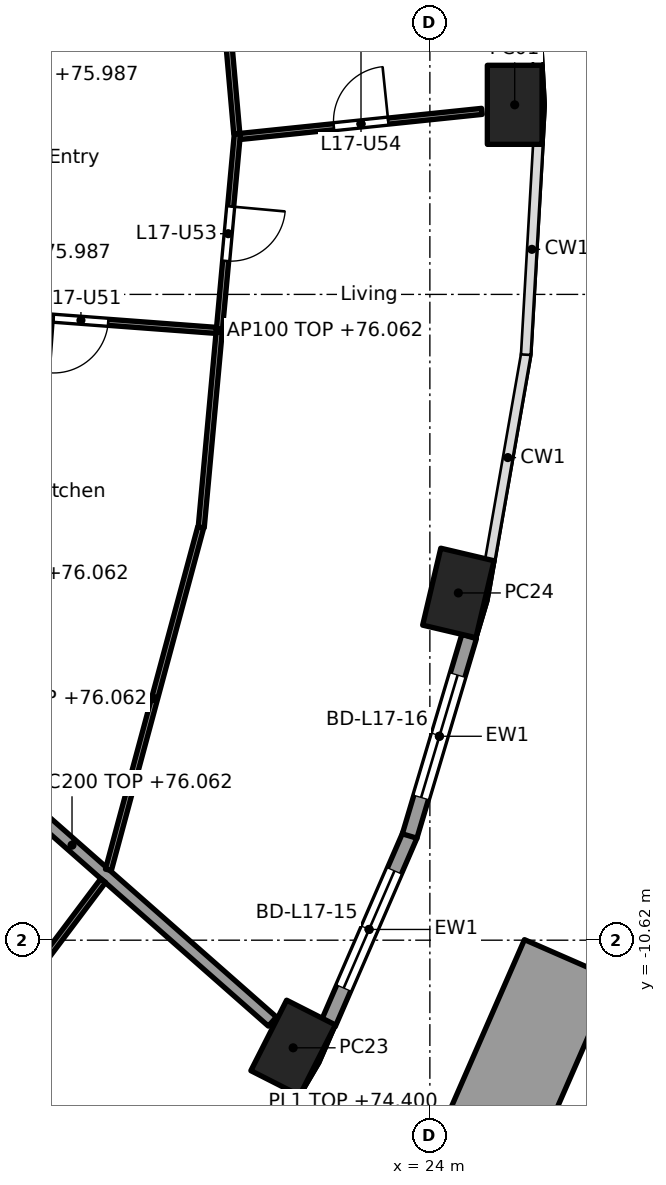
"""IFC4 building model, lengths in metres.
Left out: names, types, materials, properties, quantities, classifications, styles, units other than length and angle.
Written with IfcOpenShell. Run it as: python <this file> out.ifc"""

import sys

from ifc_helpers import new_model, si_unit, direction, frame, frame_2d, origin, origin_2d, place, context, subcontext, project, spatial, rectangle, hollow_rectangle, extrude, element, fill, save


model = new_model("IFC4")
c1 = context("Model", 3, precision=1e-05, world=origin(), true_north=direction((0.0, 1.0)))
c2 = subcontext(c1, "Body", "Model", "MODEL_VIEW")
j1 = project(units=[si_unit("LENGTHUNIT", "METRE"), si_unit("PLANEANGLEUNIT", "RADIAN")], contexts=[c1])
p1 = place(None, origin())
s1 = spatial("IfcSite", under=j1, at=p1, CompositionType="ELEMENT")
p2 = place(p1, origin())
s2 = spatial("IfcBuilding", under=s1, at=p2, CompositionType="ELEMENT")
p3 = place(p2, frame((0.0, 0.0, 73.3)))
s3 = spatial("IfcBuildingStorey", under=s2, at=p3, CompositionType="ELEMENT", Elevation=73.3)
for number, where, z_axis, x_axis in (
    (1, (25.395, 3.118, -0.26), (0.0, 0.0, 1.0), (0.0, 1.0, 0.0)),
    (2, (21.751, -12.39, -0.26), (0.0, 0.0, 1.0), (0.452, 0.892, 0.0)),
    (3, (24.468, -4.91, -0.26), (0.0, 0.0, 1.0), (0.229, 0.973, 0.0)),
):
    element("IfcColumn", number, at=place(p3, frame(where, z_axis=z_axis, x_axis=x_axis)), inside=s3, PredefinedType="COLUMN", context=c2, shape_type="SweptSolid", body=[
        extrude(hollow_rectangle(XDim=1.3, YDim=0.9, WallThickness=0.045, at=origin_2d()), origin(), (0.0, 0.0, 1.0), 3.96),
    ])
p4 = place(p3, frame((23.672, -8.893, 0.0), z_axis=(0.0, 0.0, 1.0), x_axis=(-0.397621629246, -0.917549475481, 0.0)))
e4 = element("IfcWall", 4, at=p4, inside=s3, PredefinedType="SOLIDWALL", context=c2, shape_type="SweptSolid", body=[
    extrude(rectangle(XDim=3.379, YDim=0.25, at=frame_2d((1.69, 0.0))), origin(), (0.0, 0.0, 1.0), 3.44),
])
p5 = place(p4, frame((0.64, 0.0, 0.0)))
e5 = element("IfcOpeningElement", 5, at=p5, cuts=e4, PredefinedType="OPENING", context=c2, shape_type="SweptSolid", body=[
    extrude(rectangle(XDim=2.1, YDim=2.4, at=frame_2d((1.05, 1.2))), frame((0.0, 0.135, 0.0), z_axis=(0.0, -1.0, 0.0), x_axis=(1.0, 0.0, 0.0)), (0.0, 0.0, 1.0), 0.27),
])
p6 = place(p3, frame((24.646, -5.626, 0.0), z_axis=(0.0, 0.0, 1.0), x_axis=(-0.285901631201, -0.958258971926, 0.0)))
e6 = element("IfcWall", 6, at=p6, inside=s3, PredefinedType="SOLIDWALL", context=c2, shape_type="SweptSolid", body=[
    extrude(rectangle(XDim=3.423, YDim=0.25, at=frame_2d((1.712, 0.0))), origin(), (0.0, 0.0, 1.0), 3.44),
])
p7 = place(p6, frame((0.662, 0.0, 0.0)))
e7 = element("IfcOpeningElement", 7, at=p7, cuts=e6, PredefinedType="OPENING", context=c2, shape_type="SweptSolid", body=[
    extrude(rectangle(XDim=2.1, YDim=2.4, at=frame_2d((1.05, 1.2))), frame((0.0, 0.135, 0.0), z_axis=(0.0, -1.0, 0.0), x_axis=(1.0, 0.0, 0.0)), (0.0, 0.0, 1.0), 0.27),
])
p8 = place(p3, frame((29.106, -12.307, 0.0), z_axis=(0.0, 0.0, 1.0), x_axis=(-0.452415298041, -0.891807377239, 0.0)))
e8 = element("IfcWall", 8, at=p8, inside=s3, PredefinedType="SOLIDWALL", context=c2, shape_type="SweptSolid", body=[
    extrude(rectangle(XDim=7.761, YDim=1.6, at=frame_2d((3.88, 0.0))), origin(), (0.0, 0.0, 1.0), 1.1),
])
p9 = place(p3, frame((23.219, -17.954, 0.0), z_axis=(0.0, 0.0, 1.0), x_axis=(0.40049126799, 0.916300575283, 0.0)))
e9 = element("IfcWall", 9, at=p9, inside=s3, PredefinedType="SOLIDWALL", context=c2, shape_type="SweptSolid", body=[
    extrude(rectangle(XDim=7.664, YDim=1.6, at=frame_2d((3.832, 0.0))), origin(), (0.0, 0.0, 1.0), 1.1),
])
p10 = place(p3, frame((14.82, -6.156, 0.0), z_axis=(0.0, 0.0, 1.0), x_axis=(0.750582231659, -0.660777052808, 0.0)))
e10 = element("IfcWall", 10, at=p10, inside=s3, PredefinedType="PARTITIONING", context=c2, shape_type="SweptSolid", body=[
    extrude(rectangle(XDim=8.781, YDim=0.2, at=frame_2d((4.391, 0.0))), origin(), (0.0, 0.0, 1.0), 2.762),
])
p11 = place(p3, frame((20.879, 2.597, 0.0), z_axis=(0.0, 0.0, 1.0), x_axis=(0.994666546694, 0.103142914868, 0.0)))
e11 = element("IfcWall", 11, at=p11, inside=s3, PredefinedType="PARTITIONING", context=c2, shape_type="SweptSolid", body=[
    extrude(rectangle(XDim=3.998, YDim=0.1, at=frame_2d((1.999, 0.0))), origin(), (0.0, 0.0, 1.0), 2.762),
])
p12 = place(p11, frame((1.549, 0.0, 0.0)))
e12 = element("IfcOpeningElement", 12, at=p12, cuts=e11, PredefinedType="OPENING", context=c2, shape_type="SweptSolid", body=[
    extrude(rectangle(XDim=0.9, YDim=2.1, at=frame_2d((0.45, 1.05))), frame((0.0, 0.06, 0.0), z_axis=(0.0, -1.0, 0.0), x_axis=(1.0, 0.0, 0.0)), (0.0, 0.0, 1.0), 0.12),
])
p13 = place(p3, frame((20.825, 2.642, 0.0), z_axis=(0.0, 0.0, 1.0), x_axis=(-0.087760219522, 0.996141628419, 0.0)))
e13 = element("IfcWall", 13, at=p13, inside=s3, PredefinedType="PARTITIONING", context=c2, shape_type="SweptSolid", body=[
    extrude(rectangle(XDim=6.187, YDim=0.1, at=frame_2d((3.094, 0.0))), origin(), (0.0, 0.0, 1.0), 2.762),
])
p14 = place(p3, frame((20.834, 2.642, 0.0), z_axis=(0.0, 0.0, 1.0), x_axis=(-0.091385407685, -0.995815599025, 0.0)))
e14 = element("IfcWall", 14, at=p14, inside=s3, PredefinedType="PARTITIONING", context=c2, shape_type="SweptSolid", body=[
    extrude(rectangle(XDim=6.502, YDim=0.1, at=frame_2d((3.251, 0.0))), origin(), (0.0, 0.0, 1.0), 2.762),
])
p15 = place(p14, frame((1.201, 0.0, 0.0)))
e15 = element("IfcOpeningElement", 15, at=p15, cuts=e14, PredefinedType="OPENING", context=c2, shape_type="SweptSolid", body=[
    extrude(rectangle(XDim=0.9, YDim=2.1, at=frame_2d((0.45, 1.05))), frame((0.0, 0.06, 0.0), z_axis=(0.0, -1.0, 0.0), x_axis=(1.0, 0.0, 0.0)), (0.0, 0.0, 1.0), 0.12),
])
p16 = place(p3, frame((12.661, 3.497, 0.0), z_axis=(0.0, 0.0, 1.0), x_axis=(0.961626678623, 0.274361314621, 0.0)))
e16 = element("IfcWall", 16, at=p16, inside=s3, PredefinedType="PARTITIONING", context=c2, shape_type="SweptSolid", body=[
    extrude(rectangle(XDim=8.156, YDim=0.1, at=frame_2d((4.078, 0.0))), origin(), (0.0, 0.0, 1.0), 2.687),
])
p17 = place(p16, frame((0.446, 0.0, 0.0)))
e17 = element("IfcOpeningElement", 17, at=p17, cuts=e16, PredefinedType="OPENING", context=c2, shape_type="SweptSolid", body=[
    extrude(rectangle(XDim=0.9, YDim=2.1, at=frame_2d((0.45, 1.05))), frame((0.0, 0.06, 0.0), z_axis=(0.0, -1.0, 0.0), x_axis=(1.0, 0.0, 0.0)), (0.0, 0.0, 1.0), 0.12),
])
p18 = place(p16, frame((5.39, 0.0, 0.0)))
e18 = element("IfcOpeningElement", 18, at=p18, cuts=e16, PredefinedType="OPENING", context=c2, shape_type="SweptSolid", body=[
    extrude(rectangle(XDim=0.9, YDim=2.1, at=frame_2d((0.45, 1.05))), frame((0.0, 0.06, 0.0), z_axis=(0.0, -1.0, 0.0), x_axis=(1.0, 0.0, 0.0)), (0.0, 0.0, 1.0), 0.12),
])
p19 = place(p3, frame((14.372, -15.3, 0.0), z_axis=(0.0, 0.0, 1.0), x_axis=(0.600987107857, 0.79925871668, 0.0)))
e19 = element("IfcWall", 19, at=p19, inside=s3, PredefinedType="PARTITIONING", context=c2, shape_type="SweptSolid", body=[
    extrude(rectangle(XDim=7.08, YDim=0.1, at=frame_2d((3.54, 0.0))), origin(), (0.0, 0.0, 1.0), 2.762),
])
p20 = place(p19, frame((3.115, 0.0, 0.0)))
e20 = element("IfcOpeningElement", 20, at=p20, cuts=e19, PredefinedType="OPENING", context=c2, shape_type="SweptSolid", body=[
    extrude(rectangle(XDim=0.9, YDim=2.1, at=frame_2d((0.45, 1.05))), frame((0.0, 0.06, 0.0), z_axis=(0.0, -1.0, 0.0), x_axis=(1.0, 0.0, 0.0)), (0.0, 0.0, 1.0), 0.12),
])
p21 = place(p3, frame((18.713, -9.464, 0.0), z_axis=(0.0, 0.0, 1.0), x_axis=(0.260279646259, 0.965533275316, 0.0)))
e21 = element("IfcWall", 21, at=p21, inside=s3, PredefinedType="PARTITIONING", context=c2, shape_type="SweptSolid", body=[
    extrude(rectangle(XDim=5.833, YDim=0.1, at=frame_2d((2.917, 0.0))), origin(), (0.0, 0.0, 1.0), 2.762),
])
p22 = place(p3, frame((12.665, -0.008, 0.0), z_axis=(0.0, 0.0, 1.0), x_axis=(0.997222647159, -0.074478130978, 0.0)))
e22 = element("IfcWall", 22, at=p22, inside=s3, PredefinedType="PARTITIONING", context=c2, shape_type="SweptSolid", body=[
    extrude(rectangle(XDim=7.844, YDim=0.1, at=frame_2d((3.922, 0.0))), origin(), (0.0, 0.0, 1.0), 2.687),
])
p23 = place(p22, frame((1.241, 0.0, 0.0)))
e23 = element("IfcOpeningElement", 23, at=p23, cuts=e22, PredefinedType="OPENING", context=c2, shape_type="SweptSolid", body=[
    extrude(rectangle(XDim=0.9, YDim=2.1, at=frame_2d((0.45, 1.05))), frame((0.0, 0.06, 0.0), z_axis=(0.0, -1.0, 0.0), x_axis=(1.0, 0.0, 0.0)), (0.0, 0.0, 1.0), 0.12),
])
p24 = place(p22, frame((5.163, 0.0, 0.0)))
e24 = element("IfcOpeningElement", 24, at=p24, cuts=e22, PredefinedType="OPENING", context=c2, shape_type="SweptSolid", body=[
    extrude(rectangle(XDim=0.9, YDim=2.1, at=frame_2d((0.45, 1.05))), frame((0.0, 0.06, 0.0), z_axis=(0.0, -1.0, 0.0), x_axis=(1.0, 0.0, 0.0)), (0.0, 0.0, 1.0), 0.12),
])
p25 = place(p5, origin())
e25 = element("IfcDoor", 25, at=p25, inside=s3, OperationType="SLIDING_TO_LEFT", PredefinedType="DOOR", context=c2, shape_type="SweptSolid", body=[
    extrude(rectangle(XDim=2.1, YDim=2.4, at=frame_2d((1.05, 1.2))), frame((0.0, 0.025, 0.0), z_axis=(0.0, -1.0, 0.0), x_axis=(1.0, 0.0, 0.0)), (0.0, 0.0, 1.0), 0.05),
])
fill(e5, e25)
p26 = place(p7, origin())
e26 = element("IfcDoor", 26, at=p26, inside=s3, OperationType="SLIDING_TO_LEFT", PredefinedType="DOOR", context=c2, shape_type="SweptSolid", body=[
    extrude(rectangle(XDim=2.1, YDim=2.4, at=frame_2d((1.05, 1.2))), frame((0.0, 0.025, 0.0), z_axis=(0.0, -1.0, 0.0), x_axis=(1.0, 0.0, 0.0)), (0.0, 0.0, 1.0), 0.05),
])
fill(e7, e26)
p27 = place(p24, frame((0.9, 0.0, 0.0), x_axis=(-1.0, 0.0, 0.0)))
e27 = element("IfcDoor", 27, at=p27, inside=s3, OperationType="SINGLE_SWING_RIGHT", PredefinedType="DOOR", context=c2, shape_type="SweptSolid", body=[
    extrude(rectangle(XDim=0.9, YDim=2.1, at=frame_2d((0.45, 1.05))), frame((0.0, 0.025, 0.0), z_axis=(0.0, -1.0, 0.0), x_axis=(1.0, 0.0, 0.0)), (0.0, 0.0, 1.0), 0.05),
])
fill(e24, e27)
p28 = place(p15, origin())
e28 = element("IfcDoor", 28, at=p28, inside=s3, OperationType="SINGLE_SWING_LEFT", PredefinedType="DOOR", context=c2, shape_type="SweptSolid", body=[
    extrude(rectangle(XDim=0.9, YDim=2.1, at=frame_2d((0.45, 1.05))), frame((0.0, 0.025, 0.0), z_axis=(0.0, -1.0, 0.0), x_axis=(1.0, 0.0, 0.0)), (0.0, 0.0, 1.0), 0.05),
])
fill(e15, e28)
p29 = place(p12, origin())
e29 = element("IfcDoor", 29, at=p29, inside=s3, OperationType="SINGLE_SWING_RIGHT", PredefinedType="DOOR", context=c2, shape_type="SweptSolid", body=[
    extrude(rectangle(XDim=0.9, YDim=2.1, at=frame_2d((0.45, 1.05))), frame((0.0, 0.025, 0.0), z_axis=(0.0, -1.0, 0.0), x_axis=(1.0, 0.0, 0.0)), (0.0, 0.0, 1.0), 0.05),
])
fill(e12, e29)
save(model, sys.argv[1])
